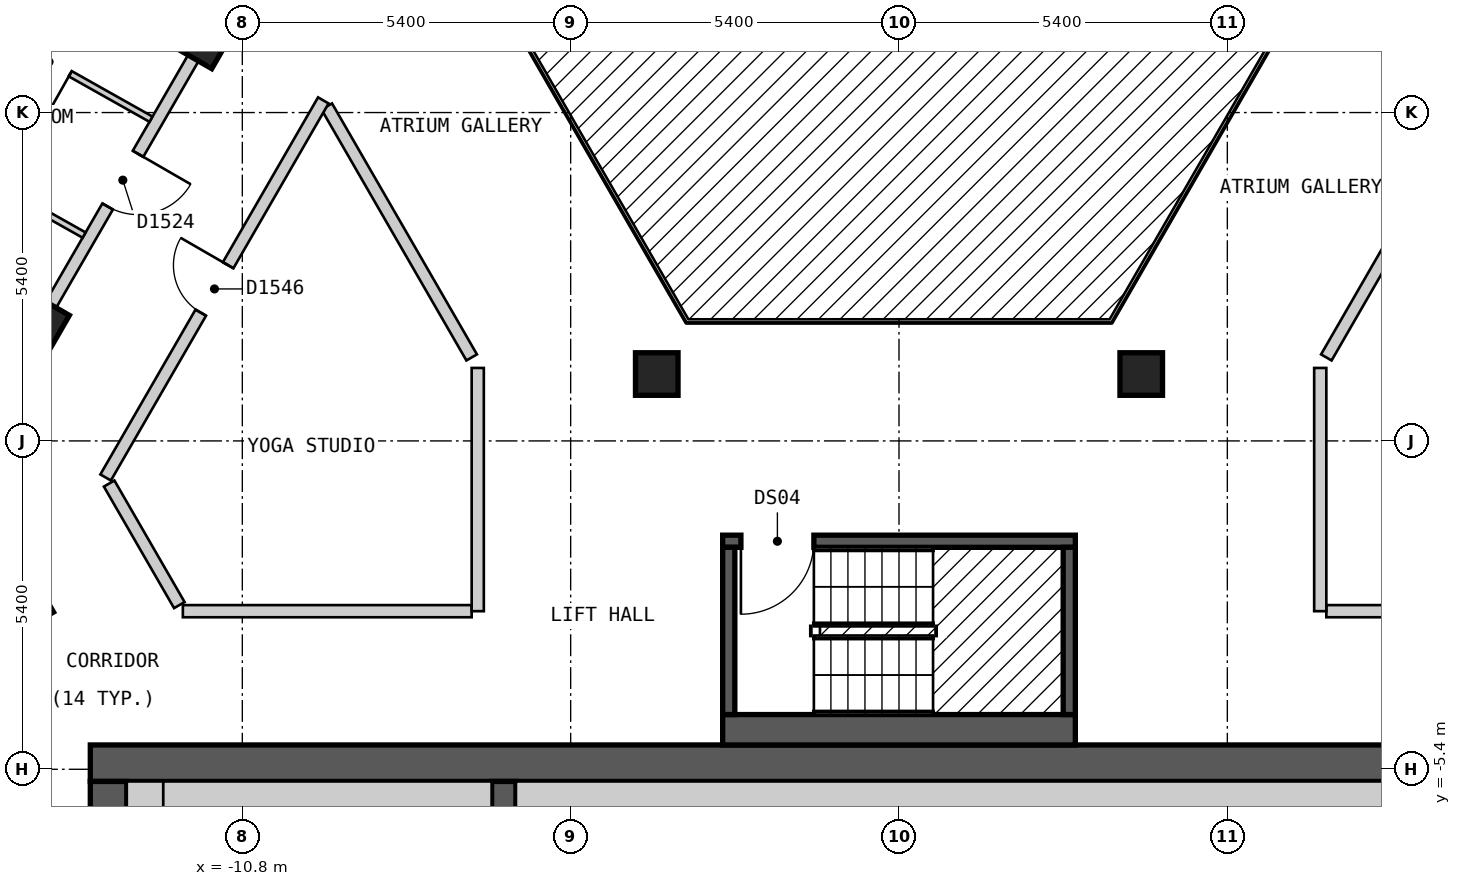
"""IFC4 building model, lengths in metres.
Left out: names, types, materials, properties, quantities, classifications, styles, units other than length and angle.
Written with IfcOpenShell. Run it as: python <this file> out.ifc"""

import sys

from ifc_helpers import new_model, si_unit, direction, frame, frame_2d, origin, origin_2d, place, context, subcontext, project, spatial, rectangle, extrude, element, fill, save


model = new_model("IFC4")
c1 = context("Model", 3, precision=1e-05, world=origin(), true_north=direction((0.0, 1.0)))
c2 = subcontext(c1, "Body", "Model", "MODEL_VIEW")
j1 = project(units=[si_unit("LENGTHUNIT", "METRE"), si_unit("PLANEANGLEUNIT", "RADIAN")], contexts=[c1])
p1 = place(None, origin())
s1 = spatial("IfcSite", under=j1, at=p1, CompositionType="ELEMENT")
p2 = place(p1, origin())
s2 = spatial("IfcBuilding", under=s1, at=p2, CompositionType="ELEMENT")
p3 = place(p2, frame((0.0, 0.0, 196.2)))
s3 = spatial("IfcBuildingStorey", under=s2, at=p3, CompositionType="ELEMENT", Elevation=196.2)
for number, where, z_axis, x_axis in (
    (1, (-14.383, -2.687, 0.0), (0.0, 0.0, 1.0), (0.5, -0.866, 0.0)),
    (2, (3.984, 1.1, 0.0), (0.0, 0.0, 1.0), (1.0, 0.0, 0.0)),
    (3, (-11.431, 6.6, 0.0), (0.0, 0.0, 1.0), (-0.5, -0.866, 0.0)),
    (4, (-3.984, 1.1, 0.0), (0.0, 0.0, 1.0), (1.0, 0.0, 0.0)),
    (5, (-14.123, 1.937, 0.0), (0.0, 0.0, 1.0), (-0.5, -0.866, 0.0)),
):
    element("IfcColumn", number, at=place(p3, frame(where, z_axis=z_axis, x_axis=x_axis)), inside=s3, PredefinedType="COLUMN", context=c2, shape_type="SweptSolid", body=[
        extrude(rectangle(XDim=0.7, YDim=0.7, at=origin_2d()), origin(), (0.0, 0.0, 1.0), 3.0),
    ])
p4 = place(p3, frame((-13.3, -5.3, 0.0), z_axis=(0.0, 0.0, 1.0), x_axis=(1.0, 0.0, 0.0)))
e6 = element("IfcWall", 6, at=p4, inside=s3, PredefinedType="SHEAR", context=c2, shape_type="SweptSolid", body=[
    extrude(rectangle(XDim=26.6, YDim=0.6, at=frame_2d((13.3, 0.0))), origin(), (0.0, 0.0, 1.0), 2.6),
])
p5 = place(p4, frame((23.65, 0.0, 0.0)))
e7 = element("IfcOpeningElement", 7, at=p5, cuts=e6, PredefinedType="OPENING", context=c2, shape_type="SweptSolid", body=[
    extrude(rectangle(XDim=1.2, YDim=2.1, at=frame_2d((0.6, 1.05))), frame((0.0, 0.31, 0.0), z_axis=(0.0, -1.0, 0.0), x_axis=(1.0, 0.0, 0.0)), (0.0, 0.0, 1.0), 0.62),
])
p6 = place(p3, frame((-13.0, -18.4, 0.0), z_axis=(0.0, 0.0, 1.0), x_axis=(0.0, 1.0, 0.0)))
e8 = element("IfcWall", 8, at=p6, inside=s3, PredefinedType="SHEAR", context=c2, shape_type="SweptSolid", body=[
    extrude(rectangle(XDim=12.8, YDim=0.6, at=frame_2d((6.4, 0.0))), origin(), (0.0, 0.0, 1.0), 2.6),
])
p7 = place(p6, frame((4.2, 0.0, 0.0)))
e9 = element("IfcOpeningElement", 9, at=p7, cuts=e8, PredefinedType="OPENING", context=c2, shape_type="SweptSolid", body=[
    extrude(rectangle(XDim=1.2, YDim=2.1, at=frame_2d((0.6, 1.05))), frame((0.0, 0.31, 0.0), z_axis=(0.0, -1.0, 0.0), x_axis=(1.0, 0.0, 0.0)), (0.0, 0.0, 1.0), 0.62),
])
p8 = place(p3, frame((-6.5, -9.15, 0.0), z_axis=(0.0, 0.0, 1.0), x_axis=(0.0, 1.0, 0.0)))
e10 = element("IfcWall", 10, at=p8, inside=s3, PredefinedType="SHEAR", context=c2, shape_type="SweptSolid", body=[
    extrude(rectangle(XDim=3.55, YDim=0.4, at=frame_2d((1.775, 0.0))), origin(), (0.0, 0.0, 1.0), 2.6),
])
p9 = place(p3, frame((-2.9, -4.75, 0.0), z_axis=(0.0, 0.0, 1.0), x_axis=(1.0, 0.0, 0.0)))
e11 = element("IfcWall", 11, at=p9, inside=s3, PredefinedType="SOLIDWALL", context=c2, shape_type="SweptSolid", body=[
    extrude(rectangle(XDim=5.8, YDim=0.5, at=frame_2d((2.9, 0.0))), origin(), (0.0, 0.0, 1.0), 2.6),
])
p10 = place(p3, frame((-2.9, -1.65, 0.0), z_axis=(0.0, 0.0, 1.0), x_axis=(1.0, 0.0, 0.0)))
e12 = element("IfcWall", 12, at=p10, inside=s3, PredefinedType="SOLIDWALL", context=c2, shape_type="SweptSolid", body=[
    extrude(rectangle(XDim=5.8, YDim=0.2, at=frame_2d((2.9, 0.0))), origin(), (0.0, 0.0, 1.0), 2.6),
])
p11 = place(p10, frame((0.3, 0.0, 0.0)))
e13 = element("IfcOpeningElement", 13, at=p11, cuts=e12, PredefinedType="OPENING", context=c2, shape_type="SweptSolid", body=[
    extrude(rectangle(XDim=1.2, YDim=2.1, at=frame_2d((0.6, 1.05))), frame((0.0, 0.11, 0.0), z_axis=(0.0, -1.0, 0.0), x_axis=(1.0, 0.0, 0.0)), (0.0, 0.0, 1.0), 0.22),
])
for number, where, z_axis, x_axis in (
    (14, (-2.8, -4.5, 0.0), (0.0, 0.0, 1.0), (0.0, 1.0, 0.0)),
    (15, (2.8, -4.5, 0.0), (0.0, 0.0, 1.0), (0.0, 1.0, 0.0)),
):
    element("IfcWall", number, at=place(p3, frame(where, z_axis=z_axis, x_axis=x_axis)), inside=s3, PredefinedType="SOLIDWALL", context=c2, shape_type="SweptSolid", body=[
        extrude(rectangle(XDim=2.75, YDim=0.2, at=frame_2d((1.375, 0.0))), origin(), (0.0, 0.0, 1.0), 2.6),
    ])
p12 = place(p3, frame((-9.411, 5.5, 0.0), z_axis=(0.0, 0.0, 1.0), x_axis=(0.500018099276, -0.86601495391, 0.0)))
e16 = element("IfcWall", 16, at=p12, inside=s3, PredefinedType="PARTITIONING", context=c2, shape_type="SweptSolid", body=[
    extrude(rectangle(XDim=4.765, YDim=0.2, at=frame_2d((2.383, 0.0))), origin(), (0.0, 0.0, 1.0), 2.6),
])
p13 = place(p3, frame((-12.99, -0.701, 0.0), z_axis=(0.0, 0.0, 1.0), x_axis=(0.499972710878, -0.866041158593, 0.0)))
e17 = element("IfcWall", 17, at=p13, inside=s3, PredefinedType="PARTITIONING", context=c2, shape_type="SweptSolid", body=[
    extrude(rectangle(XDim=2.308, YDim=0.2, at=frame_2d((1.154, 0.0))), origin(), (0.0, 0.0, 1.0), 2.6),
])
p14 = place(p3, frame((-11.778, -2.8, 0.0), z_axis=(0.0, 0.0, 1.0), x_axis=(1.0, 0.0, 0.0)))
e18 = element("IfcWall", 18, at=p14, inside=s3, PredefinedType="PARTITIONING", context=c2, shape_type="SweptSolid", body=[
    extrude(rectangle(XDim=4.75, YDim=0.2, at=frame_2d((2.375, 0.0))), origin(), (0.0, 0.0, 1.0), 2.6),
])
p15 = place(p3, frame((7.028, -2.8, 0.0), z_axis=(0.0, 0.0, 1.0), x_axis=(1.0, 0.0, 0.0)))
e19 = element("IfcWall", 19, at=p15, inside=s3, PredefinedType="PARTITIONING", context=c2, shape_type="SweptSolid", body=[
    extrude(rectangle(XDim=4.634, YDim=0.2, at=frame_2d((2.317, 0.0))), origin(), (0.0, 0.0, 1.0), 2.6),
])
p16 = place(p3, frame((7.028, 1.373, 0.0), z_axis=(0.0, 0.0, 1.0), x_axis=(0.499953126767, 0.866052464367, 0.0)))
e20 = element("IfcWall", 20, at=p16, inside=s3, PredefinedType="PARTITIONING", context=c2, shape_type="SweptSolid", body=[
    extrude(rectangle(XDim=4.764, YDim=0.2, at=frame_2d((2.382, 0.0))), origin(), (0.0, 0.0, 1.0), 2.6),
])
p17 = place(p3, frame((-13.048, -0.601, 0.0), z_axis=(0.0, 0.0, 1.0), x_axis=(0.499982180423, 0.866035691677, 0.0)))
e21 = element("IfcWall", 21, at=p17, inside=s3, PredefinedType="PARTITIONING", context=c2, shape_type="SweptSolid", body=[
    extrude(rectangle(XDim=7.16, YDim=0.2, at=frame_2d((3.58, 0.0))), origin(), (0.0, 0.0, 1.0), 2.6),
])
p18 = place(p17, frame((3.13, 0.0, 0.0)))
e22 = element("IfcOpeningElement", 22, at=p18, cuts=e21, PredefinedType="OPENING", context=c2, shape_type="SweptSolid", body=[
    extrude(rectangle(XDim=0.9, YDim=2.1, at=frame_2d((0.45, 1.05))), frame((0.0, 0.11, 0.0), z_axis=(0.0, -1.0, 0.0), x_axis=(1.0, 0.0, 0.0)), (0.0, 0.0, 1.0), 0.22),
])
p19 = place(p3, frame((-15.559, -0.551, 0.0), z_axis=(0.0, 0.0, 1.0), x_axis=(0.499964997208, 0.866045611713, 0.0)))
e23 = element("IfcWall", 23, at=p19, inside=s3, PredefinedType="PARTITIONING", context=c2, shape_type="SweptSolid", body=[
    extrude(rectangle(XDim=9.643, YDim=0.2, at=frame_2d((4.821, 0.0))), origin(), (0.0, 0.0, 1.0), 2.6),
])
p20 = place(p19, frame((5.088, 0.0, 0.0)))
e24 = element("IfcOpeningElement", 24, at=p20, cuts=e23, PredefinedType="OPENING", context=c2, shape_type="SweptSolid", body=[
    extrude(rectangle(XDim=1.0, YDim=2.1, at=frame_2d((0.5, 1.05))), frame((0.0, 0.11, 0.0), z_axis=(0.0, -1.0, 0.0), x_axis=(1.0, 0.0, 0.0)), (0.0, 0.0, 1.0), 0.22),
])
for number, where, z_axis, x_axis in (
    (25, (6.928, -2.8, 0.0), (0.0, 0.0, 1.0), (0.0, 1.0, 0.0)),
    (26, (-6.928, -2.8, 0.0), (0.0, 0.0, 1.0), (0.0, 1.0, 0.0)),
):
    element("IfcWall", number, at=place(p3, frame(where, z_axis=z_axis, x_axis=x_axis)), inside=s3, PredefinedType="PARTITIONING", context=c2, shape_type="SweptSolid", body=[
        extrude(rectangle(XDim=4.0, YDim=0.2, at=frame_2d((2.0, 0.0))), origin(), (0.0, 0.0, 1.0), 2.6),
    ])
p21 = place(p3, frame((-16.799, 5.296, 0.0), z_axis=(0.0, 0.0, 1.0), x_axis=(0.871565499758, -0.490279083413, 0.0)))
e27 = element("IfcWall", 27, at=p21, inside=s3, PredefinedType="PARTITIONING", context=c2, shape_type="SweptSolid", body=[
    extrude(rectangle(XDim=3.897, YDim=0.1, at=frame_2d((1.949, 0.0))), origin(), (0.0, 0.0, 1.0), 2.6),
])
p22 = place(p21, frame((1.524, 0.0, 0.0)))
e28 = element("IfcOpeningElement", 28, at=p22, cuts=e27, PredefinedType="OPENING", context=c2, shape_type="SweptSolid", body=[
    extrude(rectangle(XDim=0.9, YDim=2.1, at=frame_2d((0.45, 1.05))), frame((0.0, 0.06, 0.0), z_axis=(0.0, -1.0, 0.0), x_axis=(1.0, 0.0, 0.0)), (0.0, 0.0, 1.0), 0.12),
])
p23 = place(p3, frame((-15.699, 7.202, 0.0), z_axis=(0.0, 0.0, 1.0), x_axis=(0.871565499758, -0.490279083413, 0.0)))
e29 = element("IfcWall", 29, at=p23, inside=s3, PredefinedType="PARTITIONING", context=c2, shape_type="SweptSolid", body=[
    extrude(rectangle(XDim=3.897, YDim=0.1, at=frame_2d((1.949, 0.0))), origin(), (0.0, 0.0, 1.0), 2.6),
])
p24 = place(p23, frame((1.574, 0.0, 0.0)))
e30 = element("IfcOpeningElement", 30, at=p24, cuts=e29, PredefinedType="OPENING", context=c2, shape_type="SweptSolid", body=[
    extrude(rectangle(XDim=0.8, YDim=2.1, at=frame_2d((0.4, 1.05))), frame((0.0, 0.06, 0.0), z_axis=(0.0, -1.0, 0.0), x_axis=(1.0, 0.0, 0.0)), (0.0, 0.0, 1.0), 0.12),
])
p25 = place(p3, frame((-12.4, -9.15, 0.0), z_axis=(0.0, 0.0, 1.0), x_axis=(0.0, 1.0, 0.0)))
e31 = element("IfcWall", 31, at=p25, inside=s3, PredefinedType="SOLIDWALL", context=c2, shape_type="SweptSolid", body=[
    extrude(rectangle(XDim=3.55, YDim=0.6, at=frame_2d((1.775, 0.0))), origin(), (0.0, 0.0, 1.0), 2.6),
])
p26 = place(p3, frame((-12.1, -5.9, 0.0), z_axis=(0.0, 0.0, 1.0), x_axis=(1.0, 0.0, 0.0)))
e32 = element("IfcWall", 32, at=p26, inside=s3, PredefinedType="SOLIDWALL", context=c2, shape_type="SweptSolid", body=[
    extrude(rectangle(XDim=5.4, YDim=0.6, at=frame_2d((2.7, 0.0))), origin(), (0.0, 0.0, 1.0), 2.6),
])
p27 = place(p3, frame((-6.3, -5.9, 0.0), z_axis=(0.0, 0.0, 1.0), x_axis=(1.0, 0.0, 0.0)))
e33 = element("IfcWall", 33, at=p27, inside=s3, PredefinedType="SOLIDWALL", context=c2, shape_type="SweptSolid", body=[
    extrude(rectangle(XDim=16.1, YDim=0.6, at=frame_2d((8.05, 0.0))), origin(), (0.0, 0.0, 1.0), 2.6),
])
p28 = place(p11, origin())
e34 = element("IfcDoor", 34, at=p28, inside=s3, OperationType="SINGLE_SWING_LEFT", PredefinedType="DOOR", context=c2, shape_type="SweptSolid", body=[
    extrude(rectangle(XDim=1.2, YDim=2.1, at=frame_2d((0.6, 1.05))), frame((0.0, 0.025, 0.0), z_axis=(0.0, -1.0, 0.0), x_axis=(1.0, 0.0, 0.0)), (0.0, 0.0, 1.0), 0.05),
])
fill(e13, e34)
p29 = place(p20, origin())
e35 = element("IfcDoor", 35, at=p29, inside=s3, OperationType="SINGLE_SWING_RIGHT", PredefinedType="DOOR", context=c2, shape_type="SweptSolid", body=[
    extrude(rectangle(XDim=1.0, YDim=2.1, at=frame_2d((0.5, 1.05))), frame((0.0, 0.025, 0.0), z_axis=(0.0, -1.0, 0.0), x_axis=(1.0, 0.0, 0.0)), (0.0, 0.0, 1.0), 0.05),
])
fill(e24, e35)
p30 = place(p24, origin())
e36 = element("IfcDoor", 36, at=p30, inside=s3, OperationType="SINGLE_SWING_RIGHT", PredefinedType="DOOR", context=c2, shape_type="SweptSolid", body=[
    extrude(rectangle(XDim=0.8, YDim=2.1, at=frame_2d((0.4, 1.05))), frame((0.0, 0.025, 0.0), z_axis=(0.0, -1.0, 0.0), x_axis=(1.0, 0.0, 0.0)), (0.0, 0.0, 1.0), 0.05),
])
fill(e30, e36)
p31 = place(p18, origin())
e37 = element("IfcDoor", 37, at=p31, inside=s3, OperationType="SINGLE_SWING_RIGHT", PredefinedType="DOOR", context=c2, shape_type="SweptSolid", body=[
    extrude(rectangle(XDim=0.9, YDim=2.1, at=frame_2d((0.45, 1.05))), frame((0.0, 0.025, 0.0), z_axis=(0.0, -1.0, 0.0), x_axis=(1.0, 0.0, 0.0)), (0.0, 0.0, 1.0), 0.05),
])
fill(e22, e37)
save(model, sys.argv[1])
